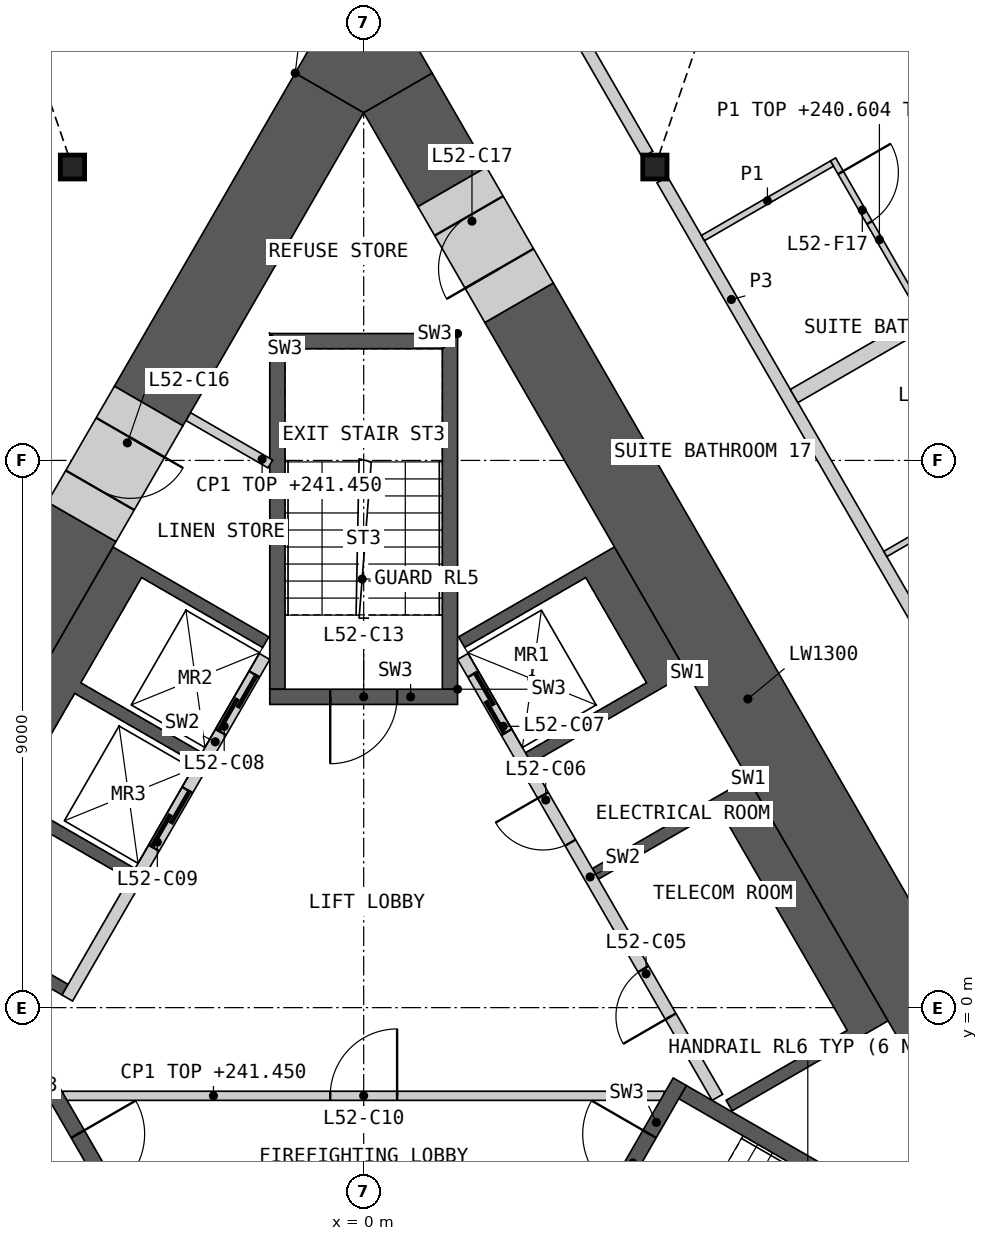
"""IFC4 building model, lengths in metres.
Left out: names, types, materials, properties, quantities, classifications, styles, units other than length and angle.
Written with IfcOpenShell. Run it as: python <this file> out.ifc"""

import sys

from ifc_helpers import new_model, si_unit, direction, frame, frame_2d, origin, origin_2d, place, context, subcontext, project, spatial, polyline, rectangle, i_section, outline, extrude, element, fill, save


model = new_model("IFC4")
c1 = context("Model", 3, precision=1e-05, world=origin(), true_north=direction((0.0, 1.0)))
c2 = subcontext(c1, "Body", "Model", "MODEL_VIEW")
j1 = project(units=[si_unit("LENGTHUNIT", "METRE"), si_unit("PLANEANGLEUNIT", "RADIAN")], contexts=[c1])
p1 = place(None, origin())
s1 = spatial("IfcSite", under=j1, at=p1, CompositionType="ELEMENT")
p2 = place(p1, origin())
s2 = spatial("IfcBuilding", under=s1, at=p2, CompositionType="ELEMENT")
p3 = place(p2, frame((0.0, 0.0, 238.2)))
s3 = spatial("IfcBuildingStorey", under=s2, at=p3, CompositionType="ELEMENT", Elevation=238.2)
for number, where, z_axis, x_axis in (
    (1, (-4.789, 13.825, 0.0), (0.0, 0.0, 1.0), (1.0, 0.0, 0.0)),
    (2, (4.789, 13.825, 0.0), (0.0, 0.0, 1.0), (1.0, 0.0, 0.0)),
):
    element("IfcColumn", number, at=place(p3, frame(where, z_axis=z_axis, x_axis=x_axis)), inside=s3, PredefinedType="COLUMN", context=c2, shape_type="SweptSolid", body=[
        extrude(i_section(OverallWidth=0.399, OverallDepth=0.393, WebThickness=0.023, FlangeThickness=0.037, at=origin_2d()), origin(), (0.0, 0.0, 1.0), 3.6),
    ])
p4 = place(p3, origin())
e3 = element("IfcWall", 3, at=p4, inside=s3, PredefinedType="SHEAR", context=c2, shape_type="SweptSolid", body=[
    extrude(outline(polyline([(6.324, 3.767), (8.624, -0.217), (8.231, -0.444), (6.061, -1.697), (5.96, -1.524), (7.952, -0.374), (5.852, 3.263), (3.861, 2.113), (3.76, 2.287), (5.931, 3.54), (6.324, 3.767)])), origin(), (0.0, 0.0, 1.0), 3.25),
])
p5 = place(p3, origin())
e4 = element("IfcWall", 4, at=p5, inside=s3, PredefinedType="SHEAR", context=c2, shape_type="SweptSolid", body=[
    extrude(outline(polyline([(5.324, 5.499), (4.931, 5.272), (2.76, 4.019), (2.66, 4.192), (4.652, 5.342), (3.652, 7.074), (1.66, 5.924), (1.561, 6.097), (3.731, 7.35), (4.124, 7.577), (5.324, 5.499)])), origin(), (0.0, 0.0, 1.0), 3.25),
])
p6 = place(p3, frame((5.817, -1.476, 0.0), z_axis=(0.0, 0.0, 1.0), x_axis=(-0.500002616675, 0.866023893041, 0.0)))
e5 = element("IfcWall", 5, at=p6, inside=s3, PredefinedType="SOLIDWALL", context=c2, shape_type="SweptSolid", body=[
    extrude(rectangle(XDim=8.373, YDim=0.2, at=frame_2d((4.187, 0.0))), origin(), (0.0, 0.0, 1.0), 3.25),
])
p7 = place(p6, frame((1.537, 0.0, 0.0)))
e6 = element("IfcOpeningElement", 6, at=p7, cuts=e5, PredefinedType="OPENING", context=c2, shape_type="SweptSolid", body=[
    extrude(rectangle(XDim=0.9, YDim=2.1, at=frame_2d((0.45, 1.05))), frame((0.0, 0.11, 0.0), z_axis=(0.0, -1.0, 0.0), x_axis=(1.0, 0.0, 0.0)), (0.0, 0.0, 1.0), 0.22),
])
p8 = place(p6, frame((4.837, 0.0, 0.0)))
e7 = element("IfcOpeningElement", 7, at=p8, cuts=e5, PredefinedType="OPENING", context=c2, shape_type="SweptSolid", body=[
    extrude(rectangle(XDim=0.9, YDim=2.1, at=frame_2d((0.45, 1.05))), frame((0.0, 0.11, 0.0), z_axis=(0.0, -1.0, 0.0), x_axis=(1.0, 0.0, 0.0)), (0.0, 0.0, 1.0), 0.22),
])
p9 = place(p6, frame((6.937, 0.0, 0.0)))
e8 = element("IfcOpeningElement", 8, at=p9, cuts=e5, PredefinedType="OPENING", context=c2, shape_type="SweptSolid", body=[
    extrude(rectangle(XDim=1.1, YDim=2.1, at=frame_2d((0.55, 1.05))), frame((0.0, 0.11, 0.0), z_axis=(0.0, -1.0, 0.0), x_axis=(1.0, 0.0, 0.0)), (0.0, 0.0, 1.0), 0.22),
])
p10 = place(p3, origin())
e9 = element("IfcWall", 9, at=p10, inside=s3, PredefinedType="SHEAR", context=c2, shape_type="SweptSolid", body=[
    extrude(outline(polyline([(-7.524, 1.688), (-4.124, 7.577), (-3.731, 7.35), (-1.561, 6.097), (-1.66, 5.924), (-3.652, 7.074), (-4.652, 5.342), (-2.66, 4.192), (-2.76, 4.019), (-4.752, 5.169), (-5.752, 3.437), (-3.76, 2.287), (-3.861, 2.113), (-5.852, 3.263), (-6.852, 1.531), (-4.861, 0.381), (-4.96, 0.208), (-7.131, 1.461), (-7.524, 1.688)])), origin(), (0.0, 0.0, 1.0), 3.25),
])
p11 = place(p3, frame((-1.631, 5.776, 0.0), z_axis=(0.0, 0.0, 1.0), x_axis=(-0.499992876559, -0.866029516466, 0.0)))
e10 = element("IfcWall", 10, at=p11, inside=s3, PredefinedType="SOLIDWALL", context=c2, shape_type="SweptSolid", body=[
    extrude(rectangle(XDim=6.486, YDim=0.2, at=frame_2d((3.243, 0.0))), origin(), (0.0, 0.0, 1.0), 3.25),
])
p12 = place(p11, frame((0.337, 0.0, 0.0)))
e11 = element("IfcOpeningElement", 11, at=p12, cuts=e10, PredefinedType="OPENING", context=c2, shape_type="SweptSolid", body=[
    extrude(rectangle(XDim=1.1, YDim=2.1, at=frame_2d((0.55, 1.05))), frame((0.0, 0.11, 0.0), z_axis=(0.0, -1.0, 0.0), x_axis=(1.0, 0.0, 0.0)), (0.0, 0.0, 1.0), 0.22),
])
p13 = place(p11, frame((2.537, 0.0, 0.0)))
e12 = element("IfcOpeningElement", 12, at=p13, cuts=e10, PredefinedType="OPENING", context=c2, shape_type="SweptSolid", body=[
    extrude(rectangle(XDim=1.1, YDim=2.1, at=frame_2d((0.55, 1.05))), frame((0.0, 0.11, 0.0), z_axis=(0.0, -1.0, 0.0), x_axis=(1.0, 0.0, 0.0)), (0.0, 0.0, 1.0), 0.22),
])
p14 = place(p3, frame((-4.941, -1.45, 0.0), z_axis=(0.0, 0.0, 1.0), x_axis=(1.0, 0.0, 0.0)))
e13 = element("IfcWall", 13, at=p14, inside=s3, PredefinedType="PARTITIONING", context=c2, shape_type="SweptSolid", body=[
    extrude(rectangle(XDim=9.882, YDim=0.15, at=frame_2d((4.941, 0.0))), origin(), (0.0, 0.0, 1.0), 3.25),
])
p15 = place(p14, frame((4.391, 0.0, 0.0)))
e14 = element("IfcOpeningElement", 14, at=p15, cuts=e13, PredefinedType="OPENING", context=c2, shape_type="SweptSolid", body=[
    extrude(rectangle(XDim=1.1, YDim=2.1, at=frame_2d((0.55, 1.05))), frame((0.0, 0.085, 0.0), z_axis=(0.0, -1.0, 0.0), x_axis=(1.0, 0.0, 0.0)), (0.0, 0.0, 1.0), 0.17),
])
p16 = place(p3, frame((-5.199, -1.219, 0.0), z_axis=(0.0, 0.0, 1.0), x_axis=(0.499982516597, -0.866035497597, 0.0)))
e15 = element("IfcWall", 15, at=p16, inside=s3, PredefinedType="SHEAR", context=c2, shape_type="SweptSolid", body=[
    extrude(rectangle(XDim=3.088, YDim=0.25, at=frame_2d((1.544, 0.0))), origin(), (0.0, 0.0, 1.0), 3.25),
])
p17 = place(p16, frame((0.994, 0.0, 0.0)))
e16 = element("IfcOpeningElement", 16, at=p17, cuts=e15, PredefinedType="OPENING", context=c2, shape_type="SweptSolid", body=[
    extrude(rectangle(XDim=1.1, YDim=2.1, at=frame_2d((0.55, 1.05))), frame((0.0, 0.135, 0.0), z_axis=(0.0, -1.0, 0.0), x_axis=(1.0, 0.0, 0.0)), (0.0, 0.0, 1.0), 0.27),
])
p18 = place(p3, origin())
e17 = element("IfcWall", 17, at=p18, inside=s3, PredefinedType="SHEAR", context=c2, shape_type="SweptSolid", body=[
    extrude(outline(polyline([(10.032, -4.298), (10.374, -4.206), (5.307, -1.281), (5.182, -1.498), (10.032, -4.298)])), origin(), (0.0, 0.0, 1.0), 3.25),
])
p19 = place(p3, frame((3.655, -3.893, 0.0), z_axis=(0.0, 0.0, 1.0), x_axis=(0.499982516597, 0.866035497597, 0.0)))
e18 = element("IfcWall", 18, at=p19, inside=s3, PredefinedType="SHEAR", context=c2, shape_type="SweptSolid", body=[
    extrude(rectangle(XDim=3.088, YDim=0.25, at=frame_2d((1.544, 0.0))), origin(), (0.0, 0.0, 1.0), 3.25),
])
p20 = place(p19, frame((0.994, 0.0, 0.0)))
e19 = element("IfcOpeningElement", 19, at=p20, cuts=e18, PredefinedType="OPENING", context=c2, shape_type="SweptSolid", body=[
    extrude(rectangle(XDim=1.1, YDim=2.1, at=frame_2d((0.55, 1.05))), frame((0.0, 0.135, 0.0), z_axis=(0.0, -1.0, 0.0), x_axis=(1.0, 0.0, 0.0)), (0.0, 0.0, 1.0), 0.27),
])
p21 = place(p3, origin())
e20 = element("IfcWall", 20, at=p21, inside=s3, PredefinedType="SHEAR", context=c2, shape_type="SweptSolid", body=[
    extrude(outline(polyline([(1.544, 5.237), (1.544, 11.087), (1.294, 10.837), (1.294, 5.237), (1.544, 5.237)])), origin(), (0.0, 0.0, 1.0), 3.25),
])
p22 = place(p3, origin())
e21 = element("IfcWall", 21, at=p22, inside=s3, PredefinedType="SHEAR", context=c2, shape_type="SweptSolid", body=[
    extrude(outline(polyline([(1.544, 11.087), (-1.544, 11.087), (-1.294, 10.837), (1.294, 10.837), (1.544, 11.087)])), origin(), (0.0, 0.0, 1.0), 3.25),
])
p23 = place(p3, origin())
e22 = element("IfcWall", 22, at=p23, inside=s3, PredefinedType="SHEAR", context=c2, shape_type="SweptSolid", body=[
    extrude(outline(polyline([(-1.294, 10.837), (-1.544, 11.087), (-1.544, 5.237), (-1.294, 5.237), (-1.294, 10.837)])), origin(), (0.0, 0.0, 1.0), 3.25),
])
p24 = place(p3, frame((1.544, 5.112, 0.0), z_axis=(0.0, 0.0, 1.0), x_axis=(-1.0, 0.0, 0.0)))
e23 = element("IfcWall", 23, at=p24, inside=s3, PredefinedType="SHEAR", context=c2, shape_type="SweptSolid", body=[
    extrude(rectangle(XDim=3.088, YDim=0.25, at=frame_2d((1.544, 0.0))), origin(), (0.0, 0.0, 1.0), 3.25),
])
p25 = place(p24, frame((0.994, 0.0, 0.0)))
e24 = element("IfcOpeningElement", 24, at=p25, cuts=e23, PredefinedType="OPENING", context=c2, shape_type="SweptSolid", body=[
    extrude(rectangle(XDim=1.1, YDim=2.1, at=frame_2d((0.55, 1.05))), frame((0.0, 0.135, 0.0), z_axis=(0.0, -1.0, 0.0), x_axis=(1.0, 0.0, 0.0)), (0.0, 0.0, 1.0), 0.27),
])
p26 = place(p3, frame((-2.886, 9.721, 0.0), z_axis=(0.0, 0.0, 1.0), x_axis=(0.865990094875, -0.500061151839, 0.0)))
e25 = element("IfcWall", 25, at=p26, inside=s3, PredefinedType="PARTITIONING", context=c2, shape_type="SweptSolid", body=[
    extrude(rectangle(XDim=1.56, YDim=0.15, at=frame_2d((0.78, 0.0))), origin(), (0.0, 0.0, 1.0), 3.25),
])
p27 = place(p3, frame((10.081, -1.441, 0.0), z_axis=(0.0, 0.0, 1.0), x_axis=(-0.500012180433, 0.866018371294, 0.0)))
e26 = element("IfcWall", 26, at=p27, inside=s3, PredefinedType="SHEAR", context=c2, shape_type="SweptSolid", body=[
    extrude(rectangle(XDim=15.05, YDim=1.3, at=frame_2d((7.525, 0.0))), origin(), (0.0, 0.0, 1.0), 3.25),
])
p28 = place(p3, frame((1.456, 13.499, 0.0), z_axis=(0.0, 0.0, 1.0), x_axis=(-0.499990639951, 0.866030807744, 0.0)))
e27 = element("IfcWall", 27, at=p28, inside=s3, PredefinedType="SHEAR", context=c2, shape_type="SweptSolid", body=[
    extrude(rectangle(XDim=1.786, YDim=1.3, at=frame_2d((0.893, 0.0))), origin(), (0.0, 0.0, 1.0), 3.25),
])
p29 = place(p3, frame((-4.636, 7.99, 0.0), z_axis=(0.0, 0.0, 1.0), x_axis=(-0.500022813292, -0.866012232124, 0.0)))
e28 = element("IfcWall", 28, at=p29, inside=s3, PredefinedType="SHEAR", context=c2, shape_type="SweptSolid", body=[
    extrude(rectangle(XDim=6.802, YDim=1.3, at=frame_2d((3.401, 0.0))), origin(), (0.0, 0.0, 1.0), 3.25),
])
p30 = place(p3, frame((-0.563, 15.045, 0.0), z_axis=(0.0, 0.0, 1.0), x_axis=(-0.500011498138, -0.866018765229, 0.0)))
e29 = element("IfcWall", 29, at=p30, inside=s3, PredefinedType="SHEAR", context=c2, shape_type="SweptSolid", body=[
    extrude(rectangle(XDim=5.947, YDim=1.3, at=frame_2d((2.973, 0.0))), origin(), (0.0, 0.0, 1.0), 3.25),
])
p31 = place(p3, origin())
e30 = element("IfcWall", 30, at=p31, inside=s3, PredefinedType="SHEAR", context=c2, shape_type="SweptSolid", body=[
    extrude(outline(polyline([(-1.126, 15.371), (0.0, 17.321), (1.126, 15.371), (0.0, 14.72), (-1.126, 15.371)])), origin(), (0.0, 0.0, 1.0), 3.25),
])
p32 = place(p3, frame((-3.536, 9.896, 0.0), z_axis=(0.0, 0.0, 1.0), x_axis=(-0.499981787252, -0.866035918664, 0.0)))
e31 = element("IfcWall", 31, at=p32, inside=s3, PredefinedType="SHEAR", context=c2, shape_type="SweptSolid", body=[
    extrude(rectangle(XDim=2.2, YDim=1.3, at=frame_2d((1.1, 0.0))), origin(), (0.0, 0.0, 1.0), 3.25),
])
p33 = place(p32, frame((0.6, 0.0, 0.0)))
e32 = element("IfcOpeningElement", 32, at=p33, cuts=e31, PredefinedType="OPENING", context=c2, shape_type="SweptSolid", body=[
    extrude(rectangle(XDim=1.0, YDim=2.1, at=frame_2d((0.5, 1.05))), frame((0.0, 0.66, 0.0), z_axis=(0.0, -1.0, 0.0), x_axis=(1.0, 0.0, 0.0)), (0.0, 0.0, 1.0), 1.32),
])
p34 = place(p3, frame((2.556, 11.593, 0.0), z_axis=(0.0, 0.0, 1.0), x_axis=(-0.499946605688, 0.86605622881, 0.0)))
e33 = element("IfcWall", 33, at=p34, inside=s3, PredefinedType="SHEAR", context=c2, shape_type="SweptSolid", body=[
    extrude(rectangle(XDim=2.2, YDim=1.3, at=frame_2d((1.1, 0.0))), origin(), (0.0, 0.0, 1.0), 3.25),
])
p35 = place(p34, frame((0.65, 0.0, 0.0)))
e34 = element("IfcOpeningElement", 34, at=p35, cuts=e33, PredefinedType="OPENING", context=c2, shape_type="SweptSolid", body=[
    extrude(rectangle(XDim=1.0, YDim=2.1, at=frame_2d((0.5, 1.05))), frame((0.0, 0.66, 0.0), z_axis=(0.0, -1.0, 0.0), x_axis=(1.0, 0.0, 0.0)), (0.0, 0.0, 1.0), 1.32),
])
p36 = place(p3, frame((4.91, 13.616, 0.0), z_axis=(0.0, 0.0, 1.0), x_axis=(0.50000207303, -0.866024206917, 0.0)))
e35 = element("IfcWall", 35, at=p36, inside=s3, PredefinedType="PARTITIONING", context=c2, shape_type="SweptSolid", body=[
    extrude(rectangle(XDim=9.095, YDim=0.2, at=frame_2d((4.547, 0.0))), origin(), (0.0, 0.0, 1.0), 3.25),
])
p37 = place(p3, frame((7.079, 10.059, 0.0), z_axis=(0.0, 0.0, 1.0), x_axis=(0.866033195618, 0.499986503906, 0.0)))
e36 = element("IfcWall", 36, at=p37, inside=s3, PredefinedType="PARTITIONING", context=c2, shape_type="SweptSolid", body=[
    extrude(rectangle(XDim=7.63, YDim=0.25, at=frame_2d((3.815, 0.0))), origin(), (0.0, 0.0, 1.0), 2.404),
])
p38 = place(p3, frame((1.913, 18.807, 0.0), z_axis=(0.0, 0.0, 1.0), x_axis=(0.499984524817, -0.866034338201, 0.0)))
e37 = element("IfcWall", 37, at=p38, inside=s3, PredefinedType="PARTITIONING", context=c2, shape_type="SweptSolid", body=[
    extrude(rectangle(XDim=5.51, YDim=0.2, at=frame_2d((2.755, 0.0))), origin(), (0.0, 0.0, 1.0), 3.25),
])
p39 = place(p38, frame((0.35, 0.0, 0.0)))
e38 = element("IfcOpeningElement", 38, at=p39, cuts=e37, PredefinedType="OPENING", context=c2, shape_type="SweptSolid", body=[
    extrude(rectangle(XDim=1.1, YDim=2.1, at=frame_2d((0.55, 1.05))), frame((0.0, 0.11, 0.0), z_axis=(0.0, -1.0, 0.0), x_axis=(1.0, 0.0, 0.0)), (0.0, 0.0, 1.0), 0.22),
])
p40 = place(p3, frame((7.719, 13.95, 0.0), z_axis=(0.0, 0.0, 1.0), x_axis=(0.500008851346, -0.866020293397, 0.0)))
e39 = element("IfcWall", 39, at=p40, inside=s3, PredefinedType="PARTITIONING", context=c2, shape_type="SweptSolid", body=[
    extrude(rectangle(XDim=6.1, YDim=0.1, at=frame_2d((3.05, 0.0))), origin(), (0.0, 0.0, 1.0), 2.404),
])
p41 = place(p40, frame((4.9, 0.0, 0.0)))
e40 = element("IfcOpeningElement", 40, at=p41, cuts=e39, PredefinedType="OPENING", context=c2, shape_type="SweptSolid", body=[
    extrude(rectangle(XDim=0.95, YDim=2.1, at=frame_2d((0.475, 1.05))), frame((0.0, 0.06, 0.0), z_axis=(0.0, -1.0, 0.0), x_axis=(1.0, 0.0, 0.0)), (0.0, 0.0, 1.0), 0.12),
])
p42 = place(p40, frame((0.25, 0.0, 0.0)))
e41 = element("IfcOpeningElement", 41, at=p42, cuts=e39, PredefinedType="OPENING", context=c2, shape_type="SweptSolid", body=[
    extrude(rectangle(XDim=0.95, YDim=2.1, at=frame_2d((0.475, 1.05))), frame((0.0, 0.06, 0.0), z_axis=(0.0, -1.0, 0.0), x_axis=(1.0, 0.0, 0.0)), (0.0, 0.0, 1.0), 0.12),
])
p43 = place(p3, frame((8.579, 7.461, 0.0), z_axis=(0.0, 0.0, 1.0), x_axis=(0.866014668023, 0.500018594424, 0.0)))
e42 = element("IfcWall", 42, at=p43, inside=s3, PredefinedType="PARTITIONING", context=c2, shape_type="SweptSolid", body=[
    extrude(rectangle(XDim=2.45, YDim=0.1, at=frame_2d((1.225, 0.0))), origin(), (0.0, 0.0, 1.0), 2.404),
])
p44 = place(p3, frame((5.579, 12.657, 0.0), z_axis=(0.0, 0.0, 1.0), x_axis=(0.866057815567, 0.499943856944, 0.0)))
e43 = element("IfcWall", 43, at=p44, inside=s3, PredefinedType="PARTITIONING", context=c2, shape_type="SweptSolid", body=[
    extrude(rectangle(XDim=2.45, YDim=0.1, at=frame_2d((1.225, 0.0))), origin(), (0.0, 0.0, 1.0), 2.404),
])
p45 = place(p7, origin())
e44 = element("IfcDoor", 44, at=p45, inside=s3, OperationType="SINGLE_SWING_LEFT", PredefinedType="DOOR", context=c2, shape_type="SweptSolid", body=[
    extrude(rectangle(XDim=0.9, YDim=2.1, at=frame_2d((0.45, 1.05))), frame((0.0, 0.025, 0.0), z_axis=(0.0, -1.0, 0.0), x_axis=(1.0, 0.0, 0.0)), (0.0, 0.0, 1.0), 0.05),
])
fill(e6, e44)
p46 = place(p8, origin())
e45 = element("IfcDoor", 45, at=p46, inside=s3, OperationType="SINGLE_SWING_RIGHT", PredefinedType="DOOR", context=c2, shape_type="SweptSolid", body=[
    extrude(rectangle(XDim=0.9, YDim=2.1, at=frame_2d((0.45, 1.05))), frame((0.0, 0.025, 0.0), z_axis=(0.0, -1.0, 0.0), x_axis=(1.0, 0.0, 0.0)), (0.0, 0.0, 1.0), 0.05),
])
fill(e7, e45)
p47 = place(p9, origin())
e46 = element("IfcDoor", 46, at=p47, inside=s3, OperationType="SLIDING_TO_LEFT", PredefinedType="DOOR", context=c2, shape_type="SweptSolid", body=[
    extrude(rectangle(XDim=1.1, YDim=2.1, at=frame_2d((0.55, 1.05))), frame((0.0, 0.025, 0.0), z_axis=(0.0, -1.0, 0.0), x_axis=(1.0, 0.0, 0.0)), (0.0, 0.0, 1.0), 0.05),
])
fill(e8, e46)
p48 = place(p12, origin())
e47 = element("IfcDoor", 47, at=p48, inside=s3, OperationType="SLIDING_TO_LEFT", PredefinedType="DOOR", context=c2, shape_type="SweptSolid", body=[
    extrude(rectangle(XDim=1.1, YDim=2.1, at=frame_2d((0.55, 1.05))), frame((0.0, 0.025, 0.0), z_axis=(0.0, -1.0, 0.0), x_axis=(1.0, 0.0, 0.0)), (0.0, 0.0, 1.0), 0.05),
])
fill(e11, e47)
p49 = place(p13, origin())
e48 = element("IfcDoor", 48, at=p49, inside=s3, OperationType="SLIDING_TO_LEFT", PredefinedType="DOOR", context=c2, shape_type="SweptSolid", body=[
    extrude(rectangle(XDim=1.1, YDim=2.1, at=frame_2d((0.55, 1.05))), frame((0.0, 0.025, 0.0), z_axis=(0.0, -1.0, 0.0), x_axis=(1.0, 0.0, 0.0)), (0.0, 0.0, 1.0), 0.05),
])
fill(e12, e48)
p50 = place(p15, origin())
e49 = element("IfcDoor", 49, at=p50, inside=s3, OperationType="SINGLE_SWING_RIGHT", PredefinedType="DOOR", context=c2, shape_type="SweptSolid", body=[
    extrude(rectangle(XDim=1.1, YDim=2.1, at=frame_2d((0.55, 1.05))), frame((0.0, 0.025, 0.0), z_axis=(0.0, -1.0, 0.0), x_axis=(1.0, 0.0, 0.0)), (0.0, 0.0, 1.0), 0.05),
])
fill(e14, e49)
p51 = place(p17, origin())
e50 = element("IfcDoor", 50, at=p51, inside=s3, OperationType="SINGLE_SWING_LEFT", PredefinedType="DOOR", context=c2, shape_type="SweptSolid", body=[
    extrude(rectangle(XDim=1.1, YDim=2.1, at=frame_2d((0.55, 1.05))), frame((0.0, 0.025, 0.0), z_axis=(0.0, -1.0, 0.0), x_axis=(1.0, 0.0, 0.0)), (0.0, 0.0, 1.0), 0.05),
])
fill(e16, e50)
p52 = place(p20, origin())
e51 = element("IfcDoor", 51, at=p52, inside=s3, OperationType="SINGLE_SWING_RIGHT", PredefinedType="DOOR", context=c2, shape_type="SweptSolid", body=[
    extrude(rectangle(XDim=1.1, YDim=2.1, at=frame_2d((0.55, 1.05))), frame((0.0, 0.025, 0.0), z_axis=(0.0, -1.0, 0.0), x_axis=(1.0, 0.0, 0.0)), (0.0, 0.0, 1.0), 0.05),
])
fill(e19, e51)
p53 = place(p25, origin())
e52 = element("IfcDoor", 52, at=p53, inside=s3, OperationType="SINGLE_SWING_RIGHT", PredefinedType="DOOR", context=c2, shape_type="SweptSolid", body=[
    extrude(rectangle(XDim=1.1, YDim=2.1, at=frame_2d((0.55, 1.05))), frame((0.0, 0.025, 0.0), z_axis=(0.0, -1.0, 0.0), x_axis=(1.0, 0.0, 0.0)), (0.0, 0.0, 1.0), 0.05),
])
fill(e24, e52)
p54 = place(p33, origin())
e53 = element("IfcDoor", 53, at=p54, inside=s3, OperationType="SINGLE_SWING_LEFT", PredefinedType="DOOR", context=c2, shape_type="SweptSolid", body=[
    extrude(rectangle(XDim=1.0, YDim=2.1, at=frame_2d((0.5, 1.05))), frame((0.0, 0.405, 0.0), z_axis=(0.0, -1.0, 0.0), x_axis=(1.0, 0.0, 0.0)), (0.0, 0.0, 1.0), 0.05),
])
fill(e32, e53)
p55 = place(p35, origin())
e54 = element("IfcDoor", 54, at=p55, inside=s3, OperationType="SINGLE_SWING_LEFT", PredefinedType="DOOR", context=c2, shape_type="SweptSolid", body=[
    extrude(rectangle(XDim=1.0, YDim=2.1, at=frame_2d((0.5, 1.05))), frame((0.0, 0.405, 0.0), z_axis=(0.0, -1.0, 0.0), x_axis=(1.0, 0.0, 0.0)), (0.0, 0.0, 1.0), 0.05),
])
fill(e34, e54)
p56 = place(p42, origin())
e55 = element("IfcDoor", 55, at=p56, inside=s3, OperationType="SINGLE_SWING_LEFT", PredefinedType="DOOR", context=c2, shape_type="SweptSolid", body=[
    extrude(rectangle(XDim=0.95, YDim=2.1, at=frame_2d((0.475, 1.05))), frame((0.0, 0.025, 0.0), z_axis=(0.0, -1.0, 0.0), x_axis=(1.0, 0.0, 0.0)), (0.0, 0.0, 1.0), 0.05),
])
fill(e41, e55)
save(model, sys.argv[1])
